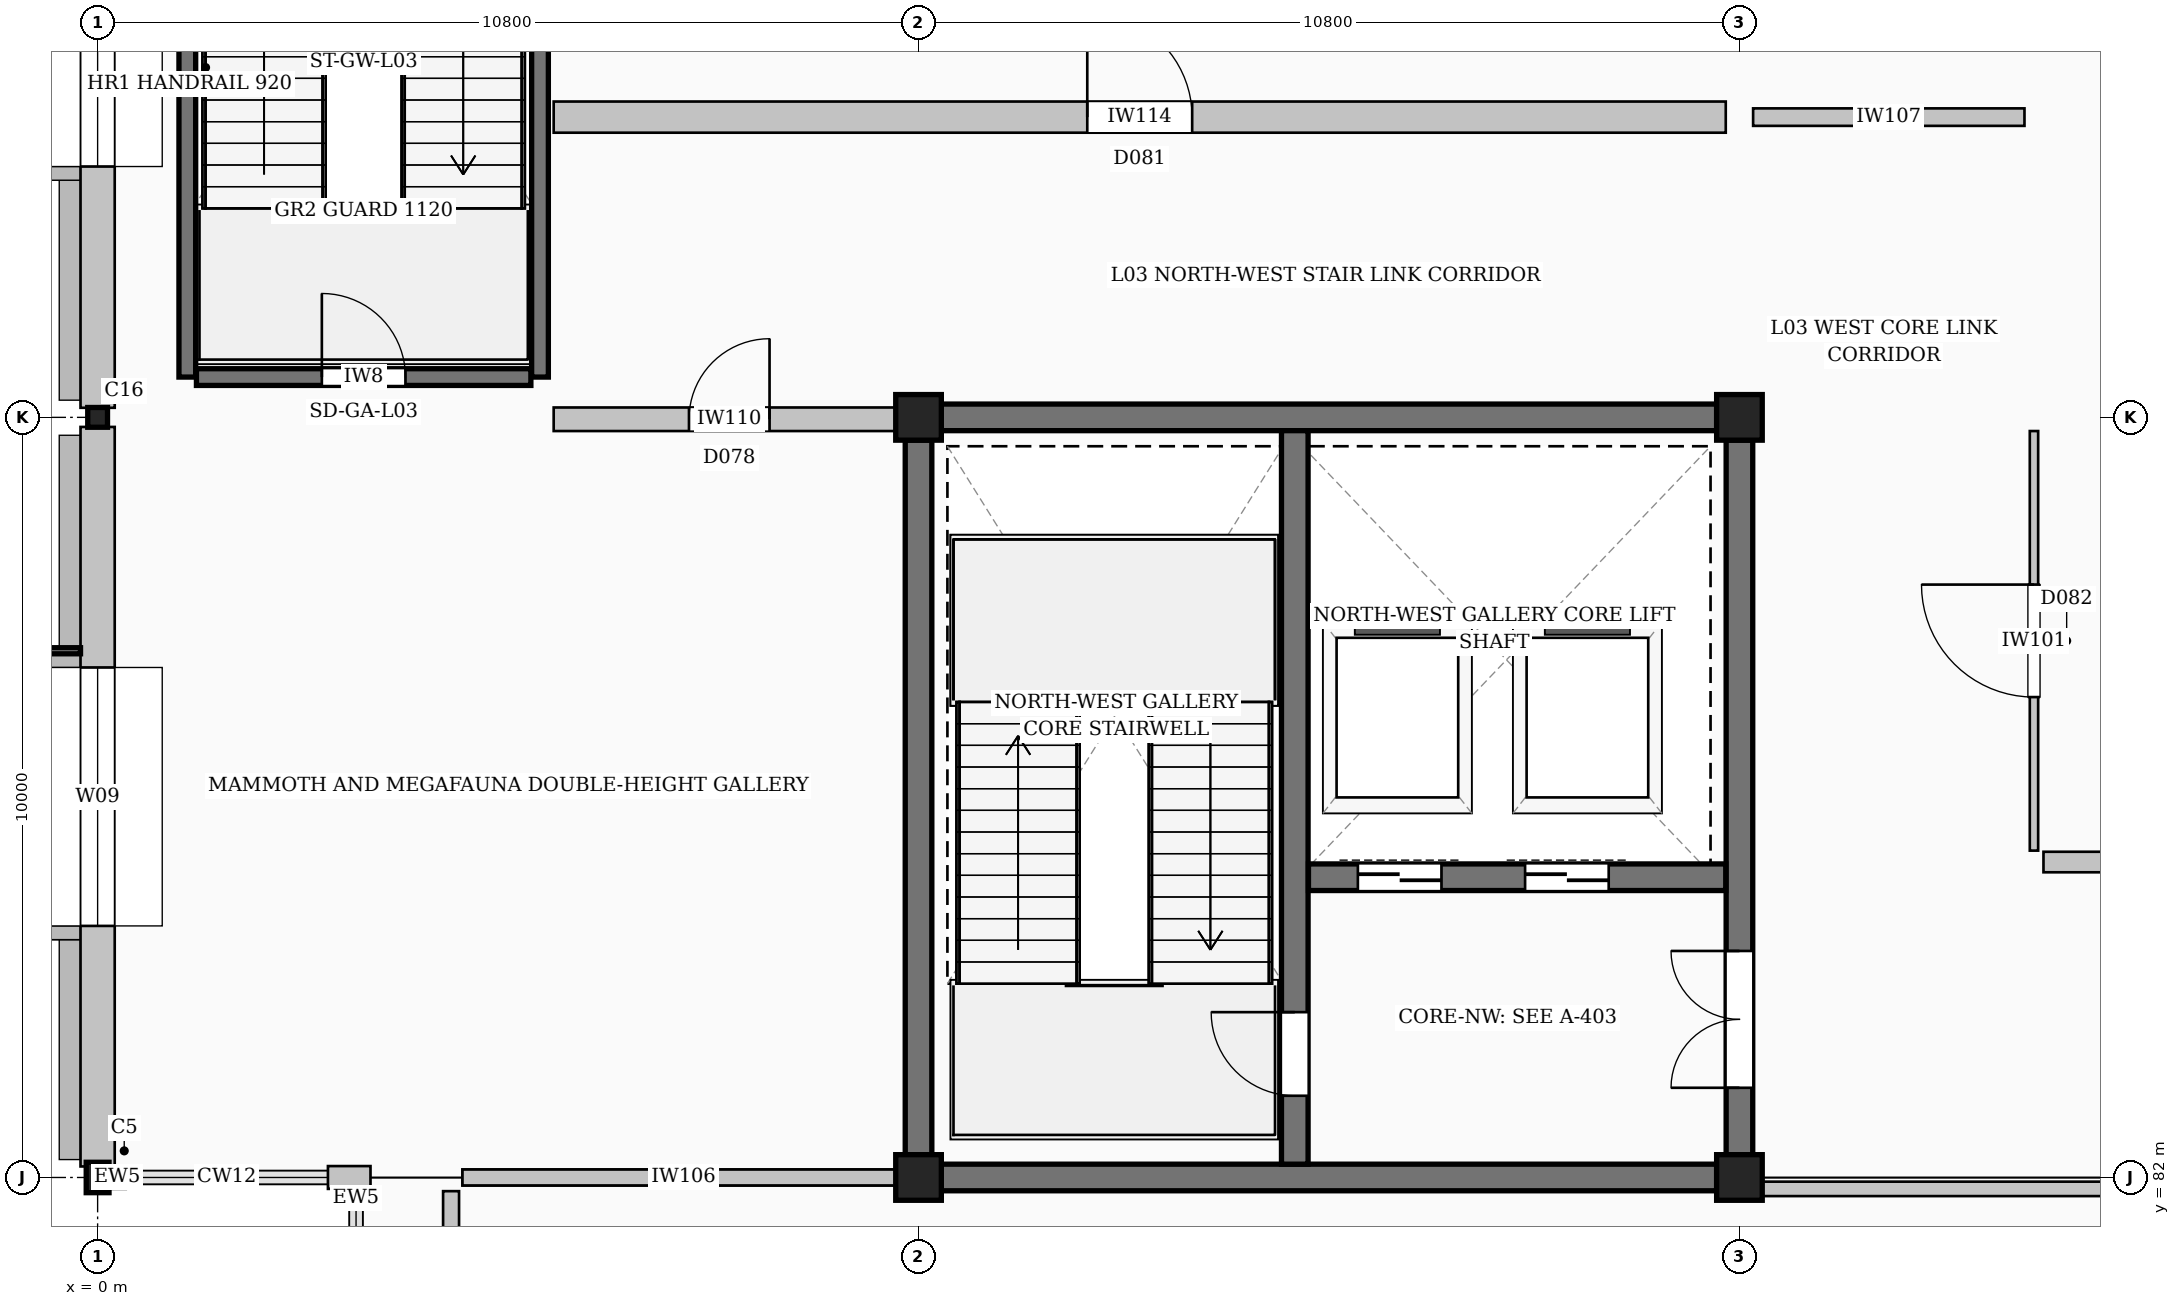
"""IFC4 building model, lengths in metres.
Left out: names, types, materials, properties, quantities, classifications, styles, units other than length and angle.
Written with IfcOpenShell. Run it as: python <this file> out.ifc"""

import sys

from ifc_helpers import new_model, si_unit, direction, frame, frame_2d, origin, origin_2d, place, context, subcontext, project, spatial, rectangle, hollow_rectangle, i_section, extrude, element, fill, save


model = new_model("IFC4")
c1 = context("Model", 3, precision=1e-05, world=origin(), true_north=direction((0.0, 1.0)))
c2 = subcontext(c1, "Body", "Model", "MODEL_VIEW")
j1 = project(units=[si_unit("LENGTHUNIT", "METRE"), si_unit("PLANEANGLEUNIT", "RADIAN")], contexts=[c1])
p1 = place(None, origin())
s1 = spatial("IfcSite", under=j1, at=p1, CompositionType="ELEMENT")
p2 = place(p1, origin())
s2 = spatial("IfcBuilding", under=s1, at=p2, CompositionType="ELEMENT")
p3 = place(p2, frame((0.0, 0.0, 14.4)))
s3 = spatial("IfcBuildingStorey", under=s2, at=p3, CompositionType="ELEMENT", Elevation=14.4)
p4 = place(p3, frame((0.0, 82.0, 0.0), z_axis=(0.0, 0.0, 1.0), x_axis=(1.0, 0.0, 0.0)))
e1 = element("IfcColumn", 1, at=p4, inside=s3, PredefinedType="COLUMN", context=c2, shape_type="SweptSolid", body=[
    extrude(i_section(OverallWidth=0.3, OverallDepth=0.4, WebThickness=0.013, FlangeThickness=0.024, FilletRadius=0.027, at=origin_2d()), origin(), (0.0, 0.0, 1.0), 9.6),
])
p5 = place(p3, frame((0.0, 92.0, 0.0), z_axis=(0.0, 0.0, 1.0), x_axis=(1.0, 0.0, 0.0)))
e2 = element("IfcColumn", 2, at=p5, inside=s3, PredefinedType="COLUMN", context=c2, shape_type="SweptSolid", body=[
    extrude(hollow_rectangle(XDim=0.26, YDim=0.26, WallThickness=0.014, InnerFilletRadius=0.014, OuterFilletRadius=0.028, at=origin_2d()), origin(), (0.0, 0.0, 1.0), 9.6),
])
for number, where, z_axis, x_axis in (
    (3, (10.8, 82.0, 0.0), (0.0, 0.0, 1.0), (1.0, 0.0, 0.0)),
    (4, (10.8, 92.0, 0.0), (0.0, 0.0, 1.0), (1.0, 0.0, 0.0)),
    (5, (21.6, 82.0, 0.0), (0.0, 0.0, 1.0), (1.0, 0.0, 0.0)),
    (6, (21.6, 92.0, 0.0), (0.0, 0.0, 1.0), (1.0, 0.0, 0.0)),
):
    element("IfcColumn", number, at=place(p3, frame(where, z_axis=z_axis, x_axis=x_axis)), inside=s3, PredefinedType="COLUMN", context=c2, shape_type="SweptSolid", body=[
        extrude(rectangle(XDim=0.6, YDim=0.6, at=origin_2d()), origin(), (0.0, 0.0, 1.0), 9.6),
    ])
p6 = place(p3, frame((0.0, 101.874, 0.0), z_axis=(0.0, 0.0, 1.0), x_axis=(0.0, -1.0, 0.0)))
e7 = element("IfcWall", 7, at=p6, inside=s3, PredefinedType="STANDARD", context=c2, shape_type="SweptSolid", body=[
    extrude(rectangle(XDim=9.748, YDim=0.45, at=frame_2d((4.874, 0.0))), origin(), (0.0, 0.0, 1.0), 9.36),
])
p7 = place(p6, frame((3.174, 0.0, 1.1)))
e8 = element("IfcOpeningElement", 8, at=p7, cuts=e7, PredefinedType="OPENING", context=c2, shape_type="SweptSolid", body=[
    extrude(rectangle(XDim=3.4, YDim=5.8, at=frame_2d((1.7, 2.9))), frame((0.0, 0.235, 0.0), z_axis=(0.0, -1.0, 0.0), x_axis=(1.0, 0.0, 0.0)), (0.0, 0.0, 1.0), 0.47),
])
p8 = place(p3, frame((0.0, 91.874, 0.0), z_axis=(0.0, 0.0, 1.0), x_axis=(0.0, -1.0, 0.0)))
e9 = element("IfcWall", 9, at=p8, inside=s3, PredefinedType="STANDARD", context=c2, shape_type="SweptSolid", body=[
    extrude(rectangle(XDim=9.729, YDim=0.45, at=frame_2d((4.865, 0.0))), origin(), (0.0, 0.0, 1.0), 9.36),
])
p9 = place(p8, frame((3.165, 0.0, 1.1)))
e10 = element("IfcOpeningElement", 10, at=p9, cuts=e9, PredefinedType="OPENING", context=c2, shape_type="SweptSolid", body=[
    extrude(rectangle(XDim=3.4, YDim=5.8, at=frame_2d((1.7, 2.9))), frame((0.0, 0.235, 0.0), z_axis=(0.0, -1.0, 0.0), x_axis=(1.0, 0.0, 0.0)), (0.0, 0.0, 1.0), 0.47),
])
p10 = place(p3, frame((0.145, 82.0, 0.0), z_axis=(0.0, 0.0, 1.0), x_axis=(1.0, 0.0, 0.0)))
e11 = element("IfcWall", 11, at=p10, inside=s3, PredefinedType="STANDARD", context=c2, shape_type="SweptSolid", body=[
    extrude(rectangle(XDim=0.225, YDim=0.3, at=frame_2d((0.113, 0.0))), origin(), (0.0, 0.0, 1.0), 9.36),
])
p11 = place(p3, frame((3.03, 82.0, 0.0), z_axis=(0.0, 0.0, 1.0), x_axis=(1.0, 0.0, 0.0)))
e12 = element("IfcWall", 12, at=p11, inside=s3, PredefinedType="STANDARD", context=c2, shape_type="SweptSolid", body=[
    extrude(rectangle(XDim=0.56, YDim=0.3, at=frame_2d((0.28, 0.0))), origin(), (0.0, 0.0, 1.0), 9.36),
])
p12 = place(p3, frame((3.4, 81.82, 0.0), z_axis=(0.0, 0.0, 1.0), x_axis=(0.0, -1.0, 0.0)))
e13 = element("IfcWall", 13, at=p12, inside=s3, PredefinedType="STANDARD", context=c2, shape_type="SweptSolid", body=[
    extrude(rectangle(XDim=0.19, YDim=0.3, at=frame_2d((0.095, 0.0))), origin(), (0.0, 0.0, 1.0), 9.36),
])
for number, where, z_axis, x_axis in (
    (14, (11.1, 82.0, 0.0), (0.0, 0.0, 1.0), (1.0, 0.0, 0.0)),
    (15, (11.1, 92.0, 0.0), (0.0, 0.0, 1.0), (1.0, 0.0, 0.0)),
):
    element("IfcWall", number, at=place(p3, frame(where, z_axis=z_axis, x_axis=x_axis)), inside=s3, PredefinedType="SHEAR", context=c2, shape_type="SweptSolid", body=[
        extrude(rectangle(XDim=10.2, YDim=0.35, at=frame_2d((5.1, 0.0))), origin(), (0.0, 0.0, 1.0), 9.36),
    ])
p13 = place(p3, frame((10.8, 82.3, 0.0), z_axis=(0.0, 0.0, 1.0), x_axis=(0.0, 1.0, 0.0)))
e16 = element("IfcWall", 16, at=p13, inside=s3, PredefinedType="SHEAR", context=c2, shape_type="SweptSolid", body=[
    extrude(rectangle(XDim=9.4, YDim=0.35, at=frame_2d((4.7, 0.0))), origin(), (0.0, 0.0, 1.0), 9.36),
])
p14 = place(p3, frame((21.6, 82.3, 0.0), z_axis=(0.0, 0.0, 1.0), x_axis=(0.0, 1.0, 0.0)))
e17 = element("IfcWall", 17, at=p14, inside=s3, PredefinedType="SHEAR", context=c2, shape_type="SweptSolid", body=[
    extrude(rectangle(XDim=9.4, YDim=0.35, at=frame_2d((4.7, 0.0))), origin(), (0.0, 0.0, 1.0), 9.36),
])
p15 = place(p14, frame((0.88, 0.0, 0.0)))
e18 = element("IfcOpeningElement", 18, at=p15, cuts=e17, PredefinedType="OPENING", context=c2, shape_type="SweptSolid", body=[
    extrude(rectangle(XDim=1.8, YDim=2.25, at=frame_2d((0.9, 1.125))), frame((0.0, 0.185, 0.0), z_axis=(0.0, -1.0, 0.0), x_axis=(1.0, 0.0, 0.0)), (0.0, 0.0, 1.0), 0.37),
])
p16 = place(p3, frame((15.75, 82.175, 0.0), z_axis=(0.0, 0.0, 1.0), x_axis=(0.0, 1.0, 0.0)))
e19 = element("IfcWall", 19, at=p16, inside=s3, PredefinedType="SHEAR", context=c2, shape_type="SweptSolid", body=[
    extrude(rectangle(XDim=9.65, YDim=0.35, at=frame_2d((4.825, 0.0))), origin(), (0.0, 0.0, 1.0), 9.36),
])
p17 = place(p16, frame((0.9, 0.0, 0.0)))
e20 = element("IfcOpeningElement", 20, at=p17, cuts=e19, PredefinedType="OPENING", context=c2, shape_type="SweptSolid", body=[
    extrude(rectangle(XDim=1.1, YDim=2.2, at=frame_2d((0.55, 1.1))), frame((0.0, 0.185, 0.0), z_axis=(0.0, -1.0, 0.0), x_axis=(1.0, 0.0, 0.0)), (0.0, 0.0, 1.0), 0.37),
])
p18 = place(p3, frame((15.93, 85.95, 0.0), z_axis=(0.0, 0.0, 1.0), x_axis=(1.0, 0.0, 0.0)))
e21 = element("IfcWall", 21, at=p18, inside=s3, PredefinedType="SHEAR", context=c2, shape_type="SweptSolid", body=[
    extrude(rectangle(XDim=5.49, YDim=0.35, at=frame_2d((2.745, 0.0))), origin(), (0.0, 0.0, 1.0), 9.36),
])
p19 = place(p18, frame((0.65, 0.0, 0.0)))
e22 = element("IfcOpeningElement", 22, at=p19, cuts=e21, PredefinedType="OPENING", context=c2, shape_type="SweptSolid", body=[
    extrude(rectangle(XDim=1.1, YDim=2.2, at=frame_2d((0.55, 1.1))), frame((0.0, 0.185, 0.0), z_axis=(0.0, -1.0, 0.0), x_axis=(1.0, 0.0, 0.0)), (0.0, 0.0, 1.0), 0.37),
])
p20 = place(p18, frame((2.85, 0.0, 0.0)))
e23 = element("IfcOpeningElement", 23, at=p20, cuts=e21, PredefinedType="OPENING", context=c2, shape_type="SweptSolid", body=[
    extrude(rectangle(XDim=1.1, YDim=2.2, at=frame_2d((0.55, 1.1))), frame((0.0, 0.185, 0.0), z_axis=(0.0, -1.0, 0.0), x_axis=(1.0, 0.0, 0.0)), (0.0, 0.0, 1.0), 0.37),
])
for number, where, z_axis, x_axis in (
    (24, (1.18, 92.53, 0.0), (0.0, 0.0, 1.0), (0.0, 1.0, 0.0)),
    (25, (5.82, 92.53, 0.0), (0.0, 0.0, 1.0), (0.0, 1.0, 0.0)),
):
    element("IfcWall", number, at=place(p3, frame(where, z_axis=z_axis, x_axis=x_axis)), inside=s3, PredefinedType="SHEAR", context=c2, shape_type="SweptSolid", body=[
        extrude(rectangle(XDim=9.14, YDim=0.22, at=frame_2d((4.57, 0.0))), origin(), (0.0, 0.0, 1.0), 9.36),
    ])
p21 = place(p3, frame((1.3, 92.53, 0.0), z_axis=(0.0, 0.0, 1.0), x_axis=(1.0, 0.0, 0.0)))
e26 = element("IfcWall", 26, at=p21, inside=s3, PredefinedType="SHEAR", context=c2, shape_type="SweptSolid", body=[
    extrude(rectangle(XDim=4.4, YDim=0.22, at=frame_2d((2.2, 0.0))), origin(), (0.0, 0.0, 1.0), 9.36),
])
p22 = place(p21, frame((1.65, 0.0, 0.0)))
e27 = element("IfcOpeningElement", 27, at=p22, cuts=e26, PredefinedType="OPENING", context=c2, shape_type="SweptSolid", body=[
    extrude(rectangle(XDim=1.1, YDim=2.2, at=frame_2d((0.55, 1.1))), frame((0.0, 0.12, 0.0), z_axis=(0.0, -1.0, 0.0), x_axis=(1.0, 0.0, 0.0)), (0.0, 0.0, 1.0), 0.24),
])
p23 = place(p3, frame((21.78, 81.85, 0.0), z_axis=(0.0, 0.0, 1.0), x_axis=(1.0, 0.0, 0.0)))
e28 = element("IfcWall", 28, at=p23, inside=s3, PredefinedType="PARTITIONING", context=c2, shape_type="SweptSolid", body=[
    extrude(rectangle(XDim=10.42, YDim=0.19, at=frame_2d((5.21, 0.0))), origin(), (0.0, 0.0, 1.0), 8.759),
])
p24 = place(p3, frame((25.6, 86.15, 0.0), z_axis=(0.0, 0.0, 1.0), x_axis=(1.0, 0.0, 0.0)))
e29 = element("IfcWall", 29, at=p24, inside=s3, PredefinedType="PARTITIONING", context=c2, shape_type="SweptSolid", body=[
    extrude(rectangle(XDim=28.22, YDim=0.27, at=frame_2d((14.11, 0.0))), origin(), (0.0, 0.0, 1.0), 9.32),
])
p25 = place(p24, frame((12.76, 0.0, 0.0)))
e30 = element("IfcOpeningElement", 30, at=p25, cuts=e29, PredefinedType="OPENING", context=c2, shape_type="SweptSolid", body=[
    extrude(rectangle(XDim=2.7, YDim=2.85, at=frame_2d((1.35, 1.425))), frame((0.0, 0.145, 0.0), z_axis=(0.0, -1.0, 0.0), x_axis=(1.0, 0.0, 0.0)), (0.0, 0.0, 1.0), 0.29),
])
p26 = place(p3, frame((6.0, 91.975, 0.0), z_axis=(0.0, 0.0, 1.0), x_axis=(1.0, 0.0, 0.0)))
e31 = element("IfcWall", 31, at=p26, inside=s3, PredefinedType="PARTITIONING", context=c2, shape_type="SweptSolid", body=[
    extrude(rectangle(XDim=4.62, YDim=0.31, at=frame_2d((2.31, 0.0))), origin(), (0.0, 0.0, 1.0), 8.92),
])
p27 = place(p26, frame((1.78, 0.0, 0.0)))
e32 = element("IfcOpeningElement", 32, at=p27, cuts=e31, PredefinedType="OPENING", context=c2, shape_type="SweptSolid", body=[
    extrude(rectangle(XDim=1.06, YDim=2.22, at=frame_2d((0.53, 1.11))), frame((0.0, 0.165, 0.0), z_axis=(0.0, -1.0, 0.0), x_axis=(1.0, 0.0, 0.0)), (0.0, 0.0, 1.0), 0.33),
])
p28 = place(p3, frame((6.0, 95.95, 0.0), z_axis=(0.0, 0.0, 1.0), x_axis=(1.0, 0.0, 0.0)))
e33 = element("IfcWall", 33, at=p28, inside=s3, PredefinedType="PARTITIONING", context=c2, shape_type="SweptSolid", body=[
    extrude(rectangle(XDim=15.42, YDim=0.41, at=frame_2d((7.71, 0.0))), origin(), (0.0, 0.0, 1.0), 9.32),
])
p29 = place(p28, frame((7.02, 0.0, 0.0)))
e34 = element("IfcOpeningElement", 34, at=p29, cuts=e33, PredefinedType="OPENING", context=c2, shape_type="SweptSolid", body=[
    extrude(rectangle(XDim=1.38, YDim=2.38, at=frame_2d((0.69, 1.19))), frame((0.0, 0.215, 0.0), z_axis=(0.0, -1.0, 0.0), x_axis=(1.0, 0.0, 0.0)), (0.0, 0.0, 1.0), 0.43),
])
p30 = place(p3, frame((25.475, 86.3, 0.0), z_axis=(0.0, 0.0, 1.0), x_axis=(0.0, 1.0, 0.0)))
e35 = element("IfcWall", 35, at=p30, inside=s3, PredefinedType="PARTITIONING", context=c2, shape_type="SweptSolid", body=[
    extrude(rectangle(XDim=5.52, YDim=0.11, at=frame_2d((2.76, 0.0))), origin(), (0.0, 0.0, 1.0), 9.32),
])
p31 = place(p30, frame((2.02, 0.0, 0.0)))
e36 = element("IfcOpeningElement", 36, at=p31, cuts=e35, PredefinedType="OPENING", context=c2, shape_type="SweptSolid", body=[
    extrude(rectangle(XDim=1.48, YDim=2.42, at=frame_2d((0.74, 1.21))), frame((0.0, 0.065, 0.0), z_axis=(0.0, -1.0, 0.0), x_axis=(1.0, 0.0, 0.0)), (0.0, 0.0, 1.0), 0.13),
])
p32 = place(p3, frame((4.8, 82.0, 0.0), z_axis=(0.0, 0.0, 1.0), x_axis=(1.0, 0.0, 0.0)))
e37 = element("IfcWall", 37, at=p32, inside=s3, PredefinedType="PARTITIONING", context=c2, shape_type="SweptSolid", body=[
    extrude(rectangle(XDim=5.82, YDim=0.21, at=frame_2d((2.91, 0.0))), origin(), (0.0, 0.0, 1.0), 4.054),
])
p33 = place(p3, frame((21.78, 95.95, 0.0), z_axis=(0.0, 0.0, 1.0), x_axis=(1.0, 0.0, 0.0)))
e38 = element("IfcWall", 38, at=p33, inside=s3, PredefinedType="PARTITIONING", context=c2, shape_type="SweptSolid", body=[
    extrude(rectangle(XDim=3.57, YDim=0.23, at=frame_2d((1.785, 0.0))), origin(), (0.0, 0.0, 1.0), 9.32),
])
p34 = place(p3, frame((4.65, 40.18, 0.0), z_axis=(0.0, 0.0, 1.0), x_axis=(0.0, 1.0, 0.0)))
e39 = element("IfcWall", 39, at=p34, inside=s3, PredefinedType="PARTITIONING", context=c2, shape_type="SweptSolid", body=[
    extrude(rectangle(XDim=41.64, YDim=0.21, at=frame_2d((20.82, 0.0))), origin(), (0.0, 0.0, 1.0), 9.32),
])
p35 = place(p3, frame((4.8, 82.0, 4.445), z_axis=(0.0, 0.0, 1.0), x_axis=(1.0, 0.0, 0.0)))
e40 = element("IfcWall", 40, at=p35, inside=s3, PredefinedType="PARTITIONING", context=c2, shape_type="SweptSolid", body=[
    extrude(rectangle(XDim=5.82, YDim=0.21, at=frame_2d((2.91, 0.0))), origin(), (0.0, 0.0, 1.0), 4.314),
])
p36 = place(p7, origin())
e41 = element("IfcWindow", 41, at=p36, inside=s3, PartitioningType="SINGLE_PANEL", PredefinedType="WINDOW", context=c2, shape_type="SweptSolid", body=[
    extrude(rectangle(XDim=3.4, YDim=5.8, at=frame_2d((1.7, 2.9))), frame((0.0, 0.03, 0.0), z_axis=(0.0, -1.0, 0.0), x_axis=(1.0, 0.0, 0.0)), (0.0, 0.0, 1.0), 0.06),
])
fill(e8, e41)
p37 = place(p9, origin())
e42 = element("IfcWindow", 42, at=p37, inside=s3, PartitioningType="SINGLE_PANEL", PredefinedType="WINDOW", context=c2, shape_type="SweptSolid", body=[
    extrude(rectangle(XDim=3.4, YDim=5.8, at=frame_2d((1.7, 2.9))), frame((0.0, 0.03, 0.0), z_axis=(0.0, -1.0, 0.0), x_axis=(1.0, 0.0, 0.0)), (0.0, 0.0, 1.0), 0.06),
])
fill(e10, e42)
p38 = place(p17, origin())
e43 = element("IfcDoor", 43, at=p38, inside=s3, OperationType="SINGLE_SWING_RIGHT", PredefinedType="DOOR", context=c2, shape_type="SweptSolid", body=[
    extrude(rectangle(XDim=1.1, YDim=2.2, at=frame_2d((0.55, 1.1))), frame((0.0, 0.025, 0.0), z_axis=(0.0, -1.0, 0.0), x_axis=(1.0, 0.0, 0.0)), (0.0, 0.0, 1.0), 0.05),
])
fill(e20, e43)
p39 = place(p15, origin())
e44 = element("IfcDoor", 44, at=p39, inside=s3, OperationType="DOUBLE_DOOR_SINGLE_SWING", PredefinedType="DOOR", context=c2, shape_type="SweptSolid", body=[
    extrude(rectangle(XDim=1.8, YDim=2.25, at=frame_2d((0.9, 1.125))), frame((0.0, 0.025, 0.0), z_axis=(0.0, -1.0, 0.0), x_axis=(1.0, 0.0, 0.0)), (0.0, 0.0, 1.0), 0.05),
])
fill(e18, e44)
p40 = place(p19, origin())
e45 = element("IfcDoor", 45, at=p40, inside=s3, OperationType="DOUBLE_DOOR_SLIDING", PredefinedType="DOOR", context=c2, shape_type="SweptSolid", body=[
    extrude(rectangle(XDim=1.1, YDim=2.2, at=frame_2d((0.55, 1.1))), frame((0.0, 0.025, 0.0), z_axis=(0.0, -1.0, 0.0), x_axis=(1.0, 0.0, 0.0)), (0.0, 0.0, 1.0), 0.05),
])
fill(e22, e45)
p41 = place(p20, origin())
e46 = element("IfcDoor", 46, at=p41, inside=s3, OperationType="DOUBLE_DOOR_SLIDING", PredefinedType="DOOR", context=c2, shape_type="SweptSolid", body=[
    extrude(rectangle(XDim=1.1, YDim=2.2, at=frame_2d((0.55, 1.1))), frame((0.0, 0.025, 0.0), z_axis=(0.0, -1.0, 0.0), x_axis=(1.0, 0.0, 0.0)), (0.0, 0.0, 1.0), 0.05),
])
fill(e23, e46)
p42 = place(p22, origin())
e47 = element("IfcDoor", 47, at=p42, inside=s3, OperationType="SINGLE_SWING_LEFT", PredefinedType="DOOR", context=c2, shape_type="SweptSolid", body=[
    extrude(rectangle(XDim=1.1, YDim=2.2, at=frame_2d((0.55, 1.1))), frame((0.0, 0.025, 0.0), z_axis=(0.0, -1.0, 0.0), x_axis=(1.0, 0.0, 0.0)), (0.0, 0.0, 1.0), 0.05),
])
fill(e27, e47)
p43 = place(p27, origin())
e48 = element("IfcDoor", 48, at=p43, inside=s3, OperationType="SINGLE_SWING_RIGHT", PredefinedType="DOOR", context=c2, shape_type="SweptSolid", body=[
    extrude(rectangle(XDim=1.06, YDim=2.22, at=frame_2d((0.53, 1.11))), frame((0.0, 0.025, 0.0), z_axis=(0.0, -1.0, 0.0), x_axis=(1.0, 0.0, 0.0)), (0.0, 0.0, 1.0), 0.05),
])
fill(e32, e48)
p44 = place(p29, origin())
e49 = element("IfcDoor", 49, at=p44, inside=s3, OperationType="SINGLE_SWING_LEFT", PredefinedType="DOOR", context=c2, shape_type="SweptSolid", body=[
    extrude(rectangle(XDim=1.38, YDim=2.38, at=frame_2d((0.69, 1.19))), frame((0.0, 0.025, 0.0), z_axis=(0.0, -1.0, 0.0), x_axis=(1.0, 0.0, 0.0)), (0.0, 0.0, 1.0), 0.05),
])
fill(e34, e49)
p45 = place(p31, origin())
e50 = element("IfcDoor", 50, at=p45, inside=s3, OperationType="SINGLE_SWING_RIGHT", PredefinedType="DOOR", context=c2, shape_type="SweptSolid", body=[
    extrude(rectangle(XDim=1.48, YDim=2.42, at=frame_2d((0.74, 1.21))), frame((0.0, 0.025, 0.0), z_axis=(0.0, -1.0, 0.0), x_axis=(1.0, 0.0, 0.0)), (0.0, 0.0, 1.0), 0.05),
])
fill(e36, e50)
save(model, sys.argv[1])
